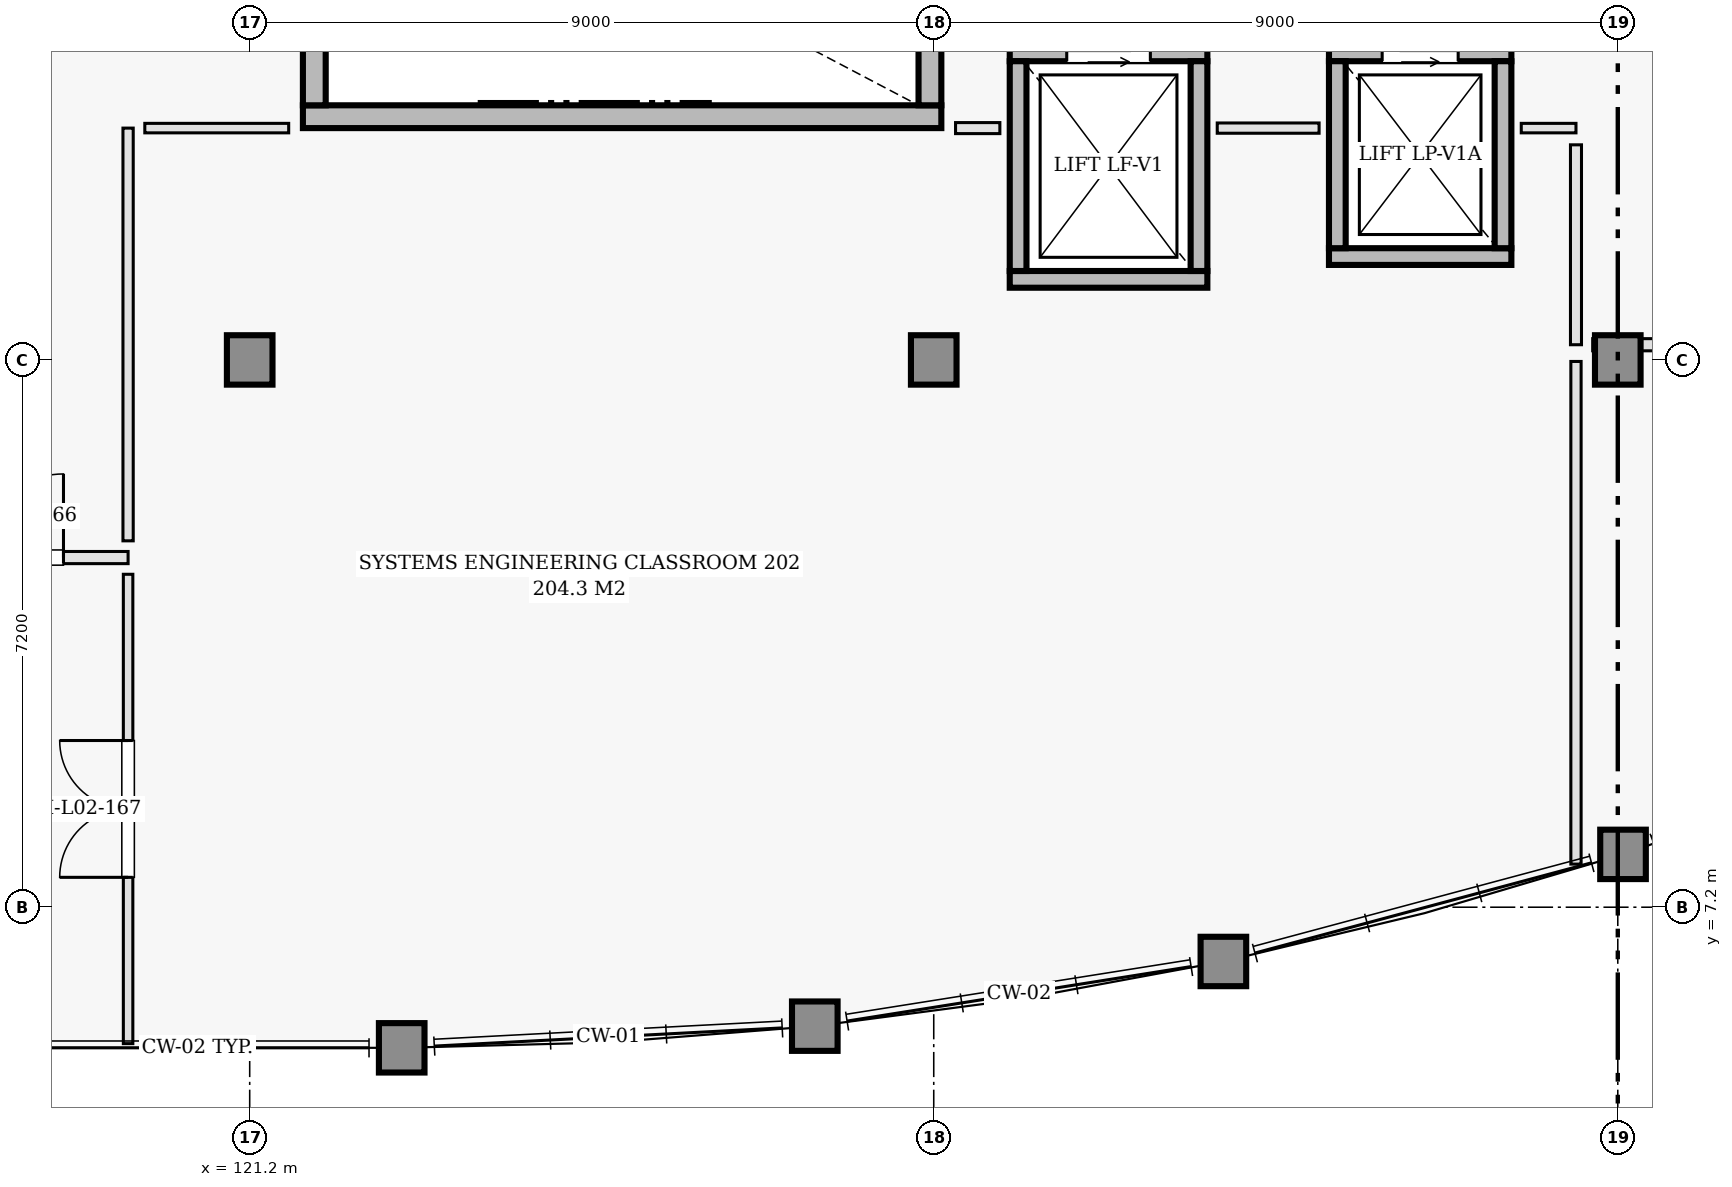
"""IFC4 building model, lengths in metres.
Left out: names, types, materials, properties, quantities, classifications, styles, units other than length and angle.
Written with IfcOpenShell. Run it as: python <this file> out.ifc"""

import sys

from ifc_helpers import new_model, si_unit, direction, frame, frame_2d, origin, origin_2d, place, context, subcontext, project, spatial, rectangle, extrude, element, fill, save


model = new_model("IFC4")
c1 = context("Model", 3, precision=1e-05, world=origin(), true_north=direction((0.0, 1.0)))
c2 = subcontext(c1, "Body", "Model", "MODEL_VIEW")
j1 = project(units=[si_unit("LENGTHUNIT", "METRE"), si_unit("PLANEANGLEUNIT", "RADIAN")], contexts=[c1])
p1 = place(None, origin())
s1 = spatial("IfcSite", under=j1, at=p1, CompositionType="ELEMENT")
p2 = place(p1, origin())
s2 = spatial("IfcBuilding", under=s1, at=p2, CompositionType="ELEMENT")
p3 = place(p2, frame((0.0, 0.0, 9.6)))
s3 = spatial("IfcBuildingStorey", under=s2, at=p3, CompositionType="ELEMENT", Elevation=9.6)
for number, where, z_axis, x_axis in (
    (1, (121.2, 14.4, 0.0), (0.0, 0.0, 1.0), (1.0, 0.0, 0.0)),
    (2, (130.2, 14.4, 0.0), (0.0, 0.0, 1.0), (1.0, 0.0, 0.0)),
    (3, (139.2, 14.4, 0.0), (0.0, 0.0, 1.0), (1.0, 0.0, 0.0)),
):
    element("IfcColumn", number, at=place(p3, frame(where, z_axis=z_axis, x_axis=x_axis)), inside=s3, PredefinedType="COLUMN", context=c2, shape_type="SweptSolid", body=[
        extrude(rectangle(XDim=0.65, YDim=0.65, at=origin_2d()), origin(), (0.0, 0.0, 1.0), 4.2),
    ])
p4 = place(p3, frame((123.2, 5.35, 0.0), z_axis=(0.0, -0.272178827903, 0.96224668648), x_axis=(1.0, 0.0, 0.0)))
e4 = element("IfcColumn", 4, at=p4, inside=s3, PredefinedType="USERDEFINED", context=c2, shape_type="SweptSolid", body=[
    extrude(rectangle(XDim=0.45, YDim=0.65, at=origin_2d()), origin(), (0.0, 0.0, 1.0), 4.365),
])
p5 = place(p3, frame((128.635, 5.635, 0.0), z_axis=(0.02863732124, -0.270824041878, 0.962202807194), x_axis=(0.994455825103, 0.105155180184, 0.0)))
e5 = element("IfcColumn", 5, at=p5, inside=s3, PredefinedType="USERDEFINED", context=c2, shape_type="SweptSolid", body=[
    extrude(rectangle(XDim=0.45, YDim=0.65, at=origin_2d()), origin(), (0.0, 0.0, 1.0), 4.365),
])
for number, where, z_axis, x_axis in (
    (6, (134.011, 6.486, 0.0), (0.057, -0.266, 0.962), (0.978, 0.209, 0.0)),
    (7, (139.269, 7.895, 0.0), (0.084, -0.259, 0.962), (0.951, 0.309, 0.0)),
):
    element("IfcColumn", number, at=place(p3, frame(where, z_axis=z_axis, x_axis=x_axis)), inside=s3, PredefinedType="USERDEFINED", context=c2, shape_type="SweptSolid", body=[
        extrude(rectangle(XDim=0.45, YDim=0.65, at=origin_2d()), origin(), (0.0, 0.0, 1.0), 4.365),
    ])
p6 = place(p3, frame((121.9, 17.6, 0.0), z_axis=(0.0, 0.0, 1.0), x_axis=(1.0, 0.0, 0.0)))
e8 = element("IfcWall", 8, at=p6, inside=s3, PredefinedType="SHEAR", context=c2, shape_type="SweptSolid", body=[
    extrude(rectangle(XDim=8.4, YDim=0.3, at=frame_2d((4.2, 0.0))), origin(), (0.0, 0.0, 1.0), 3.94),
])
for number, where, z_axis, x_axis in (
    (9, (122.05, 17.75, 0.0), (0.0, 0.0, 1.0), (0.0, 1.0, 0.0)),
    (10, (130.15, 17.75, 0.0), (0.0, 0.0, 1.0), (0.0, 1.0, 0.0)),
):
    element("IfcWall", number, at=place(p3, frame(where, z_axis=z_axis, x_axis=x_axis)), inside=s3, PredefinedType="SHEAR", context=c2, shape_type="SweptSolid", body=[
        extrude(rectangle(XDim=4.1, YDim=0.3, at=frame_2d((2.05, 0.0))), origin(), (0.0, 0.0, 1.0), 3.94),
    ])
p7 = place(p3, frame((131.2, 15.46, 0.0), z_axis=(0.0, 0.0, 1.0), x_axis=(1.0, 0.0, 0.0)))
e11 = element("IfcWall", 11, at=p7, inside=s3, PredefinedType="SHEAR", context=c2, shape_type="SweptSolid", body=[
    extrude(rectangle(XDim=2.6, YDim=0.22, at=frame_2d((1.3, 0.0))), origin(), (0.0, 0.0, 1.0), 3.94),
])
p8 = place(p3, frame((131.2, 18.44, 0.0), z_axis=(0.0, 0.0, 1.0), x_axis=(1.0, 0.0, 0.0)))
e12 = element("IfcWall", 12, at=p8, inside=s3, PredefinedType="SHEAR", context=c2, shape_type="SweptSolid", body=[
    extrude(rectangle(XDim=2.6, YDim=0.22, at=frame_2d((1.3, 0.0))), origin(), (0.0, 0.0, 1.0), 3.94),
])
p9 = place(p8, frame((0.75, 0.0, 0.0)))
e13 = element("IfcOpeningElement", 13, at=p9, cuts=e12, PredefinedType="OPENING", context=c2, shape_type="SweptSolid", body=[
    extrude(rectangle(XDim=1.1, YDim=2.15, at=frame_2d((0.55, 1.075))), frame((0.0, 0.12, 0.0), z_axis=(0.0, -1.0, 0.0), x_axis=(1.0, 0.0, 0.0)), (0.0, 0.0, 1.0), 0.24),
])
for number, where, z_axis, x_axis in (
    (14, (131.31, 15.57, 0.0), (0.0, 0.0, 1.0), (0.0, 1.0, 0.0)),
    (15, (133.69, 15.57, 0.0), (0.0, 0.0, 1.0), (0.0, 1.0, 0.0)),
):
    element("IfcWall", number, at=place(p3, frame(where, z_axis=z_axis, x_axis=x_axis)), inside=s3, PredefinedType="SHEAR", context=c2, shape_type="SweptSolid", body=[
        extrude(rectangle(XDim=2.76, YDim=0.22, at=frame_2d((1.38, 0.0))), origin(), (0.0, 0.0, 1.0), 3.94),
    ])
p10 = place(p3, frame((135.4, 15.76, 0.0), z_axis=(0.0, 0.0, 1.0), x_axis=(1.0, 0.0, 0.0)))
e16 = element("IfcWall", 16, at=p10, inside=s3, PredefinedType="SHEAR", context=c2, shape_type="SweptSolid", body=[
    extrude(rectangle(XDim=2.4, YDim=0.22, at=frame_2d((1.2, 0.0))), origin(), (0.0, 0.0, 1.0), 3.94),
])
p11 = place(p3, frame((135.4, 18.44, 0.0), z_axis=(0.0, 0.0, 1.0), x_axis=(1.0, 0.0, 0.0)))
e17 = element("IfcWall", 17, at=p11, inside=s3, PredefinedType="SHEAR", context=c2, shape_type="SweptSolid", body=[
    extrude(rectangle(XDim=2.4, YDim=0.22, at=frame_2d((1.2, 0.0))), origin(), (0.0, 0.0, 1.0), 3.94),
])
p12 = place(p11, frame((0.7, 0.0, 0.0)))
e18 = element("IfcOpeningElement", 18, at=p12, cuts=e17, PredefinedType="OPENING", context=c2, shape_type="SweptSolid", body=[
    extrude(rectangle(XDim=1.0, YDim=2.15, at=frame_2d((0.5, 1.075))), frame((0.0, 0.12, 0.0), z_axis=(0.0, -1.0, 0.0), x_axis=(1.0, 0.0, 0.0)), (0.0, 0.0, 1.0), 0.24),
])
for number, where, z_axis, x_axis in (
    (19, (135.51, 15.87, 0.0), (0.0, 0.0, 1.0), (0.0, 1.0, 0.0)),
    (20, (137.69, 15.87, 0.0), (0.0, 0.0, 1.0), (0.0, 1.0, 0.0)),
):
    element("IfcWall", number, at=place(p3, frame(where, z_axis=z_axis, x_axis=x_axis)), inside=s3, PredefinedType="SHEAR", context=c2, shape_type="SweptSolid", body=[
        extrude(rectangle(XDim=2.46, YDim=0.22, at=frame_2d((1.23, 0.0))), origin(), (0.0, 0.0, 1.0), 3.94),
    ])
p13 = place(p3, frame((116.8, 11.8, 0.0), z_axis=(0.0, 0.0, 1.0), x_axis=(1.0, 0.0, 0.0)))
e21 = element("IfcWall", 21, at=p13, inside=s3, PredefinedType="PARTITIONING", context=c2, shape_type="SweptSolid", body=[
    extrude(rectangle(XDim=2.8, YDim=0.16, at=frame_2d((1.4, 0.0))), origin(), (0.0, 0.0, 1.0), 3.94),
])
p14 = place(p13, frame((0.85, 0.0, 0.0)))
e22 = element("IfcOpeningElement", 22, at=p14, cuts=e21, PredefinedType="OPENING", context=c2, shape_type="SweptSolid", body=[
    extrude(rectangle(XDim=1.1, YDim=2.15, at=frame_2d((0.55, 1.075))), frame((0.0, 0.09, 0.0), z_axis=(0.0, -1.0, 0.0), x_axis=(1.0, 0.0, 0.0)), (0.0, 0.0, 1.0), 0.18),
])
p15 = place(p3, frame((119.6, 5.405, 0.0), z_axis=(0.0, 0.0, 1.0), x_axis=(0.0, 1.0, 0.0)))
e23 = element("IfcWall", 23, at=p15, inside=s3, PredefinedType="PARTITIONING", context=c2, shape_type="SweptSolid", body=[
    extrude(rectangle(XDim=6.175, YDim=0.125, at=frame_2d((3.087, 0.0))), origin(), (0.0, 0.0, 1.0), 3.94),
])
p16 = place(p15, frame((2.188, 0.0, 0.0)))
e24 = element("IfcOpeningElement", 24, at=p16, cuts=e23, PredefinedType="OPENING", context=c2, shape_type="SweptSolid", body=[
    extrude(rectangle(XDim=1.8, YDim=2.2, at=frame_2d((0.9, 1.1))), frame((0.0, 0.073, 0.0), z_axis=(0.0, -1.0, 0.0), x_axis=(1.0, 0.0, 0.0)), (0.0, 0.0, 1.0), 0.145),
])
p17 = place(p3, frame((119.6, 12.02, 0.0), z_axis=(0.0, 0.0, 1.0), x_axis=(0.0, 1.0, 0.0)))
e25 = element("IfcWall", 25, at=p17, inside=s3, PredefinedType="PARTITIONING", context=c2, shape_type="SweptSolid", body=[
    extrude(rectangle(XDim=5.43, YDim=0.135, at=frame_2d((2.715, 0.0))), origin(), (0.0, 0.0, 1.0), 3.125),
])
p18 = place(p3, frame((119.82, 17.45, 0.0), z_axis=(0.0, 0.0, 1.0), x_axis=(1.0, 0.0, 0.0)))
e26 = element("IfcWall", 26, at=p18, inside=s3, PredefinedType="PARTITIONING", context=c2, shape_type="SweptSolid", body=[
    extrude(rectangle(XDim=1.893, YDim=0.125, at=frame_2d((0.946, 0.0))), origin(), (0.0, 0.0, 1.0), 3.275),
])
p19 = place(p3, frame((130.487, 17.45, 0.0), z_axis=(0.0, 0.0, 1.0), x_axis=(1.0, 0.0, 0.0)))
e27 = element("IfcWall", 27, at=p19, inside=s3, PredefinedType="PARTITIONING", context=c2, shape_type="SweptSolid", body=[
    extrude(rectangle(XDim=0.583, YDim=0.145, at=frame_2d((0.292, 0.0))), origin(), (0.0, 0.0, 1.0), 3.94),
])
p20 = place(p3, frame((133.93, 17.45, 0.0), z_axis=(0.0, 0.0, 1.0), x_axis=(1.0, 0.0, 0.0)))
e28 = element("IfcWall", 28, at=p20, inside=s3, PredefinedType="PARTITIONING", context=c2, shape_type="SweptSolid", body=[
    extrude(rectangle(XDim=1.34, YDim=0.135, at=frame_2d((0.67, 0.0))), origin(), (0.0, 0.0, 1.0), 3.94),
])
p21 = place(p3, frame((137.93, 17.45, 0.0), z_axis=(0.0, 0.0, 1.0), x_axis=(1.0, 0.0, 0.0)))
e29 = element("IfcWall", 29, at=p21, inside=s3, PredefinedType="PARTITIONING", context=c2, shape_type="SweptSolid", body=[
    extrude(rectangle(XDim=0.72, YDim=0.125, at=frame_2d((0.36, 0.0))), origin(), (0.0, 0.0, 1.0), 3.94),
])
p22 = place(p3, frame((138.65, 14.6, 0.0), z_axis=(0.0, 0.0, 1.0), x_axis=(0.0, 1.0, 0.0)))
e30 = element("IfcWall", 30, at=p22, inside=s3, PredefinedType="PARTITIONING", context=c2, shape_type="SweptSolid", body=[
    extrude(rectangle(XDim=2.63, YDim=0.145, at=frame_2d((1.315, 0.0))), origin(), (0.0, 0.0, 1.0), 3.125),
])
p23 = place(p3, frame((138.65, 7.767, 0.0), z_axis=(0.0, 0.0, 1.0), x_axis=(0.0, 1.0, 0.0)))
e31 = element("IfcWall", 31, at=p23, inside=s3, PredefinedType="PARTITIONING", context=c2, shape_type="SweptSolid", body=[
    extrude(rectangle(XDim=6.613, YDim=0.135, at=frame_2d((3.306, 0.0))), origin(), (0.0, 0.0, 1.0), 3.125),
])
p24 = place(p3, frame((138.87, 14.6, 0.0), z_axis=(0.0, 0.0, 1.0), x_axis=(1.0, 0.0, 0.0)))
e32 = element("IfcWall", 32, at=p24, inside=s3, PredefinedType="PARTITIONING", context=c2, shape_type="SweptSolid", body=[
    extrude(rectangle(XDim=2.36, YDim=0.16, at=frame_2d((1.18, 0.0))), origin(), (0.0, 0.0, 1.0), 3.125),
])
p25 = place(p9, origin())
e33 = element("IfcDoor", 33, at=p25, inside=s3, OperationType="SLIDING_TO_LEFT", PredefinedType="DOOR", context=c2, shape_type="SweptSolid", body=[
    extrude(rectangle(XDim=1.1, YDim=2.15, at=frame_2d((0.55, 1.075))), frame((0.0, 0.025, 0.0), z_axis=(0.0, -1.0, 0.0), x_axis=(1.0, 0.0, 0.0)), (0.0, 0.0, 1.0), 0.05),
])
fill(e13, e33)
p26 = place(p12, origin())
e34 = element("IfcDoor", 34, at=p26, inside=s3, OperationType="SLIDING_TO_RIGHT", PredefinedType="DOOR", context=c2, shape_type="SweptSolid", body=[
    extrude(rectangle(XDim=1.0, YDim=2.15, at=frame_2d((0.5, 1.075))), frame((0.0, 0.025, 0.0), z_axis=(0.0, -1.0, 0.0), x_axis=(1.0, 0.0, 0.0)), (0.0, 0.0, 1.0), 0.05),
])
fill(e18, e34)
p27 = place(p14, origin())
e35 = element("IfcDoor", 35, at=p27, inside=s3, OperationType="SINGLE_SWING_RIGHT", PredefinedType="DOOR", context=c2, shape_type="SweptSolid", body=[
    extrude(rectangle(XDim=1.1, YDim=2.15, at=frame_2d((0.55, 1.075))), frame((0.0, 0.025, 0.0), z_axis=(0.0, -1.0, 0.0), x_axis=(1.0, 0.0, 0.0)), (0.0, 0.0, 1.0), 0.05),
])
fill(e22, e35)
p28 = place(p16, origin())
e36 = element("IfcDoor", 36, at=p28, inside=s3, OperationType="DOUBLE_DOOR_SINGLE_SWING", PredefinedType="DOOR", context=c2, shape_type="SweptSolid", body=[
    extrude(rectangle(XDim=1.8, YDim=2.2, at=frame_2d((0.9, 1.1))), frame((0.0, 0.025, 0.0), z_axis=(0.0, -1.0, 0.0), x_axis=(1.0, 0.0, 0.0)), (0.0, 0.0, 1.0), 0.05),
])
fill(e24, e36)
save(model, sys.argv[1])
